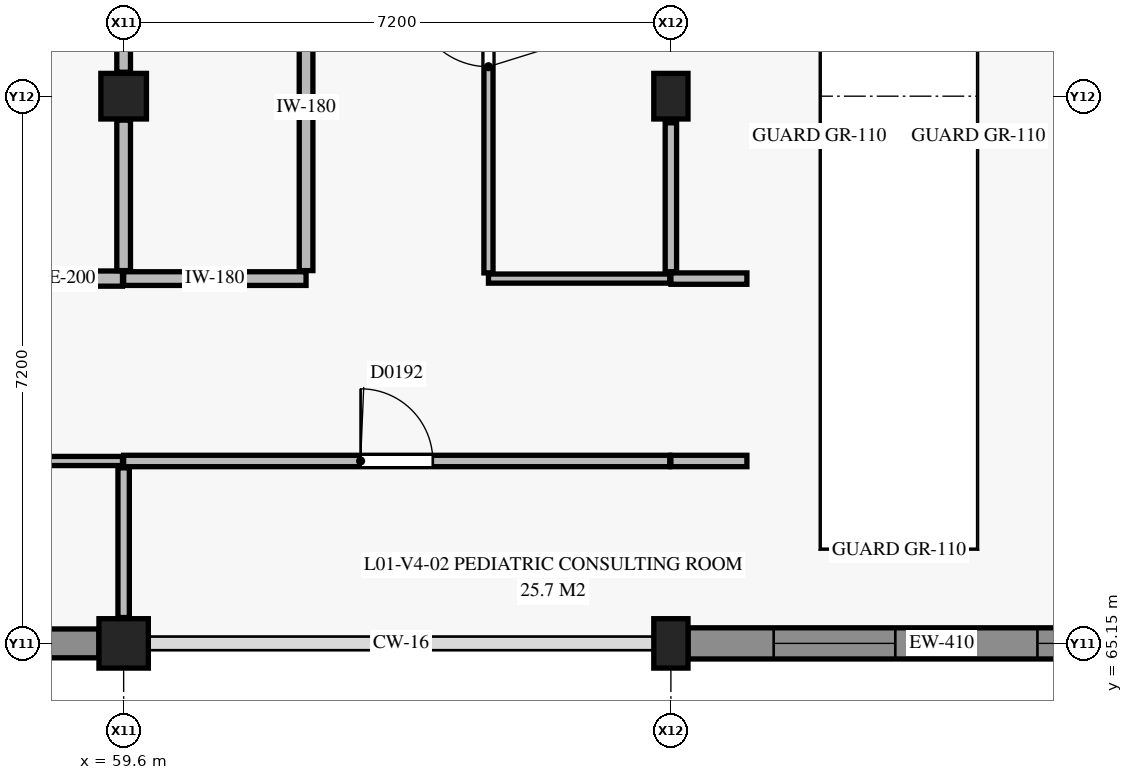
"""IFC4 building model, lengths in metres.
Left out: names, types, materials, properties, quantities, classifications, styles, units other than length and angle.
Written with IfcOpenShell. Run it as: python <this file> out.ifc"""

import sys

from ifc_helpers import new_model, si_unit, direction, frame, frame_2d, origin, origin_2d, place, context, subcontext, project, spatial, rectangle, extrude, element, fill, save


model = new_model("IFC4")
c1 = context("Model", 3, precision=1e-05, world=origin(), true_north=direction((0.0, 1.0)))
c2 = subcontext(c1, "Body", "Model", "MODEL_VIEW")
j1 = project(units=[si_unit("LENGTHUNIT", "METRE"), si_unit("PLANEANGLEUNIT", "RADIAN")], contexts=[c1])
p1 = place(None, origin())
s1 = spatial("IfcSite", under=j1, at=p1, CompositionType="ELEMENT")
p2 = place(p1, origin())
s2 = spatial("IfcBuilding", under=s1, at=p2, CompositionType="ELEMENT")
p3 = place(p2, frame((0.0, 0.0, 4.8)))
s3 = spatial("IfcBuildingStorey", under=s2, at=p3, CompositionType="ELEMENT", Elevation=4.8)
p4 = place(p3, frame((59.6, 65.15, 0.0), z_axis=(0.0, 0.0, 1.0), x_axis=(1.0, 0.0, 0.0)))
e1 = element("IfcColumn", 1, at=p4, inside=s3, PredefinedType="COLUMN", context=c2, shape_type="SweptSolid", body=[
    extrude(rectangle(XDim=0.65, YDim=0.65, at=origin_2d()), origin(), (0.0, 0.0, 1.0), 4.2),
])
p5 = place(p3, frame((59.6, 72.35, 0.0), z_axis=(0.0, 0.0, 1.0), x_axis=(1.0, 0.0, 0.0)))
e2 = element("IfcColumn", 2, at=p5, inside=s3, PredefinedType="COLUMN", context=c2, shape_type="SweptSolid", body=[
    extrude(rectangle(XDim=0.6, YDim=0.6, at=origin_2d()), origin(), (0.0, 0.0, 1.0), 4.2),
])
p6 = place(p3, frame((66.8, 65.15, 0.0), z_axis=(0.0, 0.0, 1.0), x_axis=(1.0, 0.0, 0.0)))
e3 = element("IfcColumn", 3, at=p6, inside=s3, PredefinedType="COLUMN", context=c2, shape_type="SweptSolid", body=[
    extrude(rectangle(XDim=0.45, YDim=0.65, at=origin_2d()), origin(), (0.0, 0.0, 1.0), 4.2),
])
p7 = place(p3, frame((66.8, 72.35, 0.0), z_axis=(0.0, 0.0, 1.0), x_axis=(1.0, 0.0, 0.0)))
e4 = element("IfcColumn", 4, at=p7, inside=s3, PredefinedType="COLUMN", context=c2, shape_type="SweptSolid", body=[
    extrude(rectangle(XDim=0.45, YDim=0.6, at=origin_2d()), origin(), (0.0, 0.0, 1.0), 4.2),
])
p8 = place(p3, frame((73.7, 65.15, 0.0), z_axis=(0.0, 0.0, 1.0), x_axis=(-1.0, 0.0, 0.0)))
e5 = element("IfcWall", 5, at=p8, inside=s3, PredefinedType="USERDEFINED", context=c2, shape_type="SweptSolid", body=[
    extrude(rectangle(XDim=6.675, YDim=0.41, at=frame_2d((3.337, 0.0))), origin(), (0.0, 0.0, 1.0), 3.13),
])
p9 = place(p8, frame((0.677, 0.0, 0.9)))
e6 = element("IfcOpeningElement", 6, at=p9, cuts=e5, PredefinedType="OPENING", context=c2, shape_type="SweptSolid", body=[
    extrude(rectangle(XDim=1.4, YDim=1.8, at=frame_2d((0.7, 0.9))), frame((0.0, 0.215, 0.0), z_axis=(0.0, -1.0, 0.0), x_axis=(1.0, 0.0, 0.0)), (0.0, 0.0, 1.0), 0.43),
])
p10 = place(p8, frame((3.948, 0.0, 0.9)))
e7 = element("IfcOpeningElement", 7, at=p10, cuts=e5, PredefinedType="OPENING", context=c2, shape_type="SweptSolid", body=[
    extrude(rectangle(XDim=1.6, YDim=1.8, at=frame_2d((0.8, 0.9))), frame((0.0, 0.215, 0.0), z_axis=(0.0, -1.0, 0.0), x_axis=(1.0, 0.0, 0.0)), (0.0, 0.0, 1.0), 0.43),
])
p11 = place(p3, frame((59.275, 65.15, 0.0), z_axis=(0.0, 0.0, 1.0), x_axis=(-1.0, 0.0, 0.0)))
e8 = element("IfcWall", 8, at=p11, inside=s3, PredefinedType="USERDEFINED", context=c2, shape_type="SweptSolid", body=[
    extrude(rectangle(XDim=6.575, YDim=0.38, at=frame_2d((3.288, 0.0))), origin(), (0.0, 0.0, 1.0), 3.13),
])
p12 = place(p11, frame((2.488, 0.0, 0.6)))
e9 = element("IfcOpeningElement", 9, at=p12, cuts=e8, PredefinedType="OPENING", context=c2, shape_type="SweptSolid", body=[
    extrude(rectangle(XDim=1.6, YDim=2.2, at=frame_2d((0.8, 1.1))), frame((0.0, 0.2, 0.0), z_axis=(0.0, -1.0, 0.0), x_axis=(1.0, 0.0, 0.0)), (0.0, 0.0, 1.0), 0.4),
])
p13 = place(p3, frame((59.6, 69.95, 0.0), z_axis=(0.0, 0.0, 1.0), x_axis=(1.0, 0.0, 0.0)))
e10 = element("IfcWall", 10, at=p13, inside=s3, PredefinedType="PLUMBINGWALL", context=c2, shape_type="SweptSolid", body=[
    extrude(rectangle(XDim=2.4, YDim=0.18, at=frame_2d((1.2, 0.0))), origin(), (0.0, 0.0, 1.0), 3.415),
])
p14 = place(p3, frame((62.0, 70.055, 0.0), z_axis=(0.0, 0.0, 1.0), x_axis=(0.0, 1.0, 0.0)))
e11 = element("IfcWall", 11, at=p14, inside=s3, PredefinedType="PLUMBINGWALL", context=c2, shape_type="SweptSolid", body=[
    extrude(rectangle(XDim=8.59, YDim=0.18, at=frame_2d((4.295, 0.0))), origin(), (0.0, 0.0, 1.0), 3.215),
])
p15 = place(p14, frame((3.82, 0.0, 0.0)))
e12 = element("IfcOpeningElement", 12, at=p15, cuts=e11, PredefinedType="OPENING", context=c2, shape_type="SweptSolid", body=[
    extrude(rectangle(XDim=0.95, YDim=2.1, at=frame_2d((0.475, 1.05))), frame((0.0, 0.1, 0.0), z_axis=(0.0, -1.0, 0.0), x_axis=(1.0, 0.0, 0.0)), (0.0, 0.0, 1.0), 0.2),
])
p16 = place(p3, frame((57.2, 69.95, 0.0), z_axis=(0.0, 0.0, 1.0), x_axis=(1.0, 0.0, 0.0)))
e13 = element("IfcWall", 13, at=p16, inside=s3, PredefinedType="PARTITIONING", context=c2, shape_type="SweptSolid", body=[
    extrude(rectangle(XDim=2.385, YDim=0.2, at=frame_2d((1.192, 0.0))), origin(), (0.0, 0.0, 1.0), 3.415),
])
for number, where, z_axis, x_axis in (
    (14, (66.8, 67.55, 0.0), (0.0, 0.0, 1.0), (1.0, 0.0, 0.0)),
    (15, (66.8, 69.95, 0.0), (0.0, 0.0, 1.0), (1.0, 0.0, 0.0)),
):
    element("IfcWall", number, at=place(p3, frame(where, z_axis=z_axis, x_axis=x_axis)), inside=s3, PredefinedType="PARTITIONING", context=c2, shape_type="SweptSolid", body=[
        extrude(rectangle(XDim=1.0, YDim=0.15, at=frame_2d((0.5, 0.0))), origin(), (0.0, 0.0, 1.0), 3.285),
    ])
p17 = place(p3, frame((59.6, 67.55, 0.0), z_axis=(0.0, 0.0, 1.0), x_axis=(1.0, 0.0, 0.0)))
e16 = element("IfcWall", 16, at=p17, inside=s3, PredefinedType="PARTITIONING", context=c2, shape_type="SweptSolid", body=[
    extrude(rectangle(XDim=7.185, YDim=0.15, at=frame_2d((3.592, 0.0))), origin(), (0.0, 0.0, 1.0), 3.285),
])
p18 = place(p17, frame((3.117, 0.0, 0.0)))
e17 = element("IfcOpeningElement", 17, at=p18, cuts=e16, PredefinedType="OPENING", context=c2, shape_type="SweptSolid", body=[
    extrude(rectangle(XDim=0.95, YDim=2.1, at=frame_2d((0.475, 1.05))), frame((0.0, 0.085, 0.0), z_axis=(0.0, -1.0, 0.0), x_axis=(1.0, 0.0, 0.0)), (0.0, 0.0, 1.0), 0.17),
])
p19 = place(p3, frame((54.875, 67.55, 0.0), z_axis=(0.0, 0.0, 1.0), x_axis=(1.0, 0.0, 0.0)))
e18 = element("IfcWall", 18, at=p19, inside=s3, PredefinedType="PARTITIONING", context=c2, shape_type="SweptSolid", body=[
    extrude(rectangle(XDim=4.71, YDim=0.12, at=frame_2d((2.355, 0.0))), origin(), (0.0, 0.0, 1.0), 3.415),
])
p20 = place(p3, frame((64.4, 69.95, 0.0), z_axis=(0.0, 0.0, 1.0), x_axis=(1.0, 0.0, 0.0)))
e19 = element("IfcWall", 19, at=p20, inside=s3, PredefinedType="PARTITIONING", context=c2, shape_type="SweptSolid", body=[
    extrude(rectangle(XDim=2.385, YDim=0.12, at=frame_2d((1.192, 0.0))), origin(), (0.0, 0.0, 1.0), 3.285),
])
p21 = place(p3, frame((64.4, 70.025, 0.0), z_axis=(0.0, 0.0, 1.0), x_axis=(0.0, 1.0, 0.0)))
e20 = element("IfcWall", 20, at=p21, inside=s3, PredefinedType="PARTITIONING", context=c2, shape_type="SweptSolid", body=[
    extrude(rectangle(XDim=6.425, YDim=0.12, at=frame_2d((3.212, 0.0))), origin(), (0.0, 0.0, 1.0), 3.215),
])
p22 = place(p21, frame((2.712, 0.0, 0.0)))
e21 = element("IfcOpeningElement", 21, at=p22, cuts=e20, PredefinedType="OPENING", context=c2, shape_type="SweptSolid", body=[
    extrude(rectangle(XDim=1.0, YDim=2.15, at=frame_2d((0.5, 1.075))), frame((0.0, 0.07, 0.0), z_axis=(0.0, -1.0, 0.0), x_axis=(1.0, 0.0, 0.0)), (0.0, 0.0, 1.0), 0.14),
])
p23 = place(p3, frame((59.6, 70.055, 0.0), z_axis=(0.0, 0.0, 1.0), x_axis=(0.0, 1.0, 0.0)))
e22 = element("IfcWall", 22, at=p23, inside=s3, PredefinedType="PLUMBINGWALL", context=c2, shape_type="SweptSolid", body=[
    extrude(rectangle(XDim=1.98, YDim=0.18, at=frame_2d((0.99, 0.0))), origin(), (0.0, 0.0, 1.0), 3.415),
])
p24 = place(p3, frame((59.6, 72.665, 0.0), z_axis=(0.0, 0.0, 1.0), x_axis=(0.0, 1.0, 0.0)))
e23 = element("IfcWall", 23, at=p24, inside=s3, PredefinedType="PLUMBINGWALL", context=c2, shape_type="SweptSolid", body=[
    extrude(rectangle(XDim=6.595, YDim=0.18, at=frame_2d((3.297, 0.0))), origin(), (0.0, 0.0, 1.0), 3.455),
])
p25 = place(p3, frame((59.6, 65.49, 0.0), z_axis=(0.0, 0.0, 1.0), x_axis=(0.0, 1.0, 0.0)))
e24 = element("IfcWall", 24, at=p25, inside=s3, PredefinedType="PARTITIONING", context=c2, shape_type="SweptSolid", body=[
    extrude(rectangle(XDim=1.97, YDim=0.15, at=frame_2d((0.985, 0.0))), origin(), (0.0, 0.0, 1.0), 3.415),
])
p26 = place(p3, frame((66.8, 70.04, 0.0), z_axis=(0.0, 0.0, 1.0), x_axis=(0.0, 1.0, 0.0)))
e25 = element("IfcWall", 25, at=p26, inside=s3, PredefinedType="PARTITIONING", context=c2, shape_type="SweptSolid", body=[
    extrude(rectangle(XDim=1.96, YDim=0.15, at=frame_2d((0.98, 0.0))), origin(), (0.0, 0.0, 1.0), 3.285),
])
p27 = place(p9, origin())
e26 = element("IfcWindow", 26, at=p27, inside=s3, PartitioningType="SINGLE_PANEL", PredefinedType="WINDOW", context=c2, shape_type="SweptSolid", body=[
    extrude(rectangle(XDim=1.4, YDim=1.8, at=frame_2d((0.7, 0.9))), frame((0.0, 0.03, 0.0), z_axis=(0.0, -1.0, 0.0), x_axis=(1.0, 0.0, 0.0)), (0.0, 0.0, 1.0), 0.06),
])
fill(e6, e26)
p28 = place(p10, origin())
e27 = element("IfcWindow", 27, at=p28, inside=s3, PartitioningType="SINGLE_PANEL", PredefinedType="WINDOW", context=c2, shape_type="SweptSolid", body=[
    extrude(rectangle(XDim=1.6, YDim=1.8, at=frame_2d((0.8, 0.9))), frame((0.0, 0.03, 0.0), z_axis=(0.0, -1.0, 0.0), x_axis=(1.0, 0.0, 0.0)), (0.0, 0.0, 1.0), 0.06),
])
fill(e7, e27)
p29 = place(p18, origin())
e28 = element("IfcDoor", 28, at=p29, inside=s3, OperationType="SINGLE_SWING_LEFT", PredefinedType="DOOR", context=c2, shape_type="SweptSolid", body=[
    extrude(rectangle(XDim=0.95, YDim=2.1, at=frame_2d((0.475, 1.05))), frame((0.0, 0.025, 0.0), z_axis=(0.0, -1.0, 0.0), x_axis=(1.0, 0.0, 0.0)), (0.0, 0.0, 1.0), 0.05),
])
fill(e17, e28)
p30 = place(p22, origin())
e29 = element("IfcDoor", 29, at=p30, inside=s3, OperationType="SINGLE_SWING_RIGHT", PredefinedType="DOOR", context=c2, shape_type="SweptSolid", body=[
    extrude(rectangle(XDim=1.0, YDim=2.15, at=frame_2d((0.5, 1.075))), frame((0.0, 0.025, 0.0), z_axis=(0.0, -1.0, 0.0), x_axis=(1.0, 0.0, 0.0)), (0.0, 0.0, 1.0), 0.05),
])
fill(e21, e29)
save(model, sys.argv[1])
